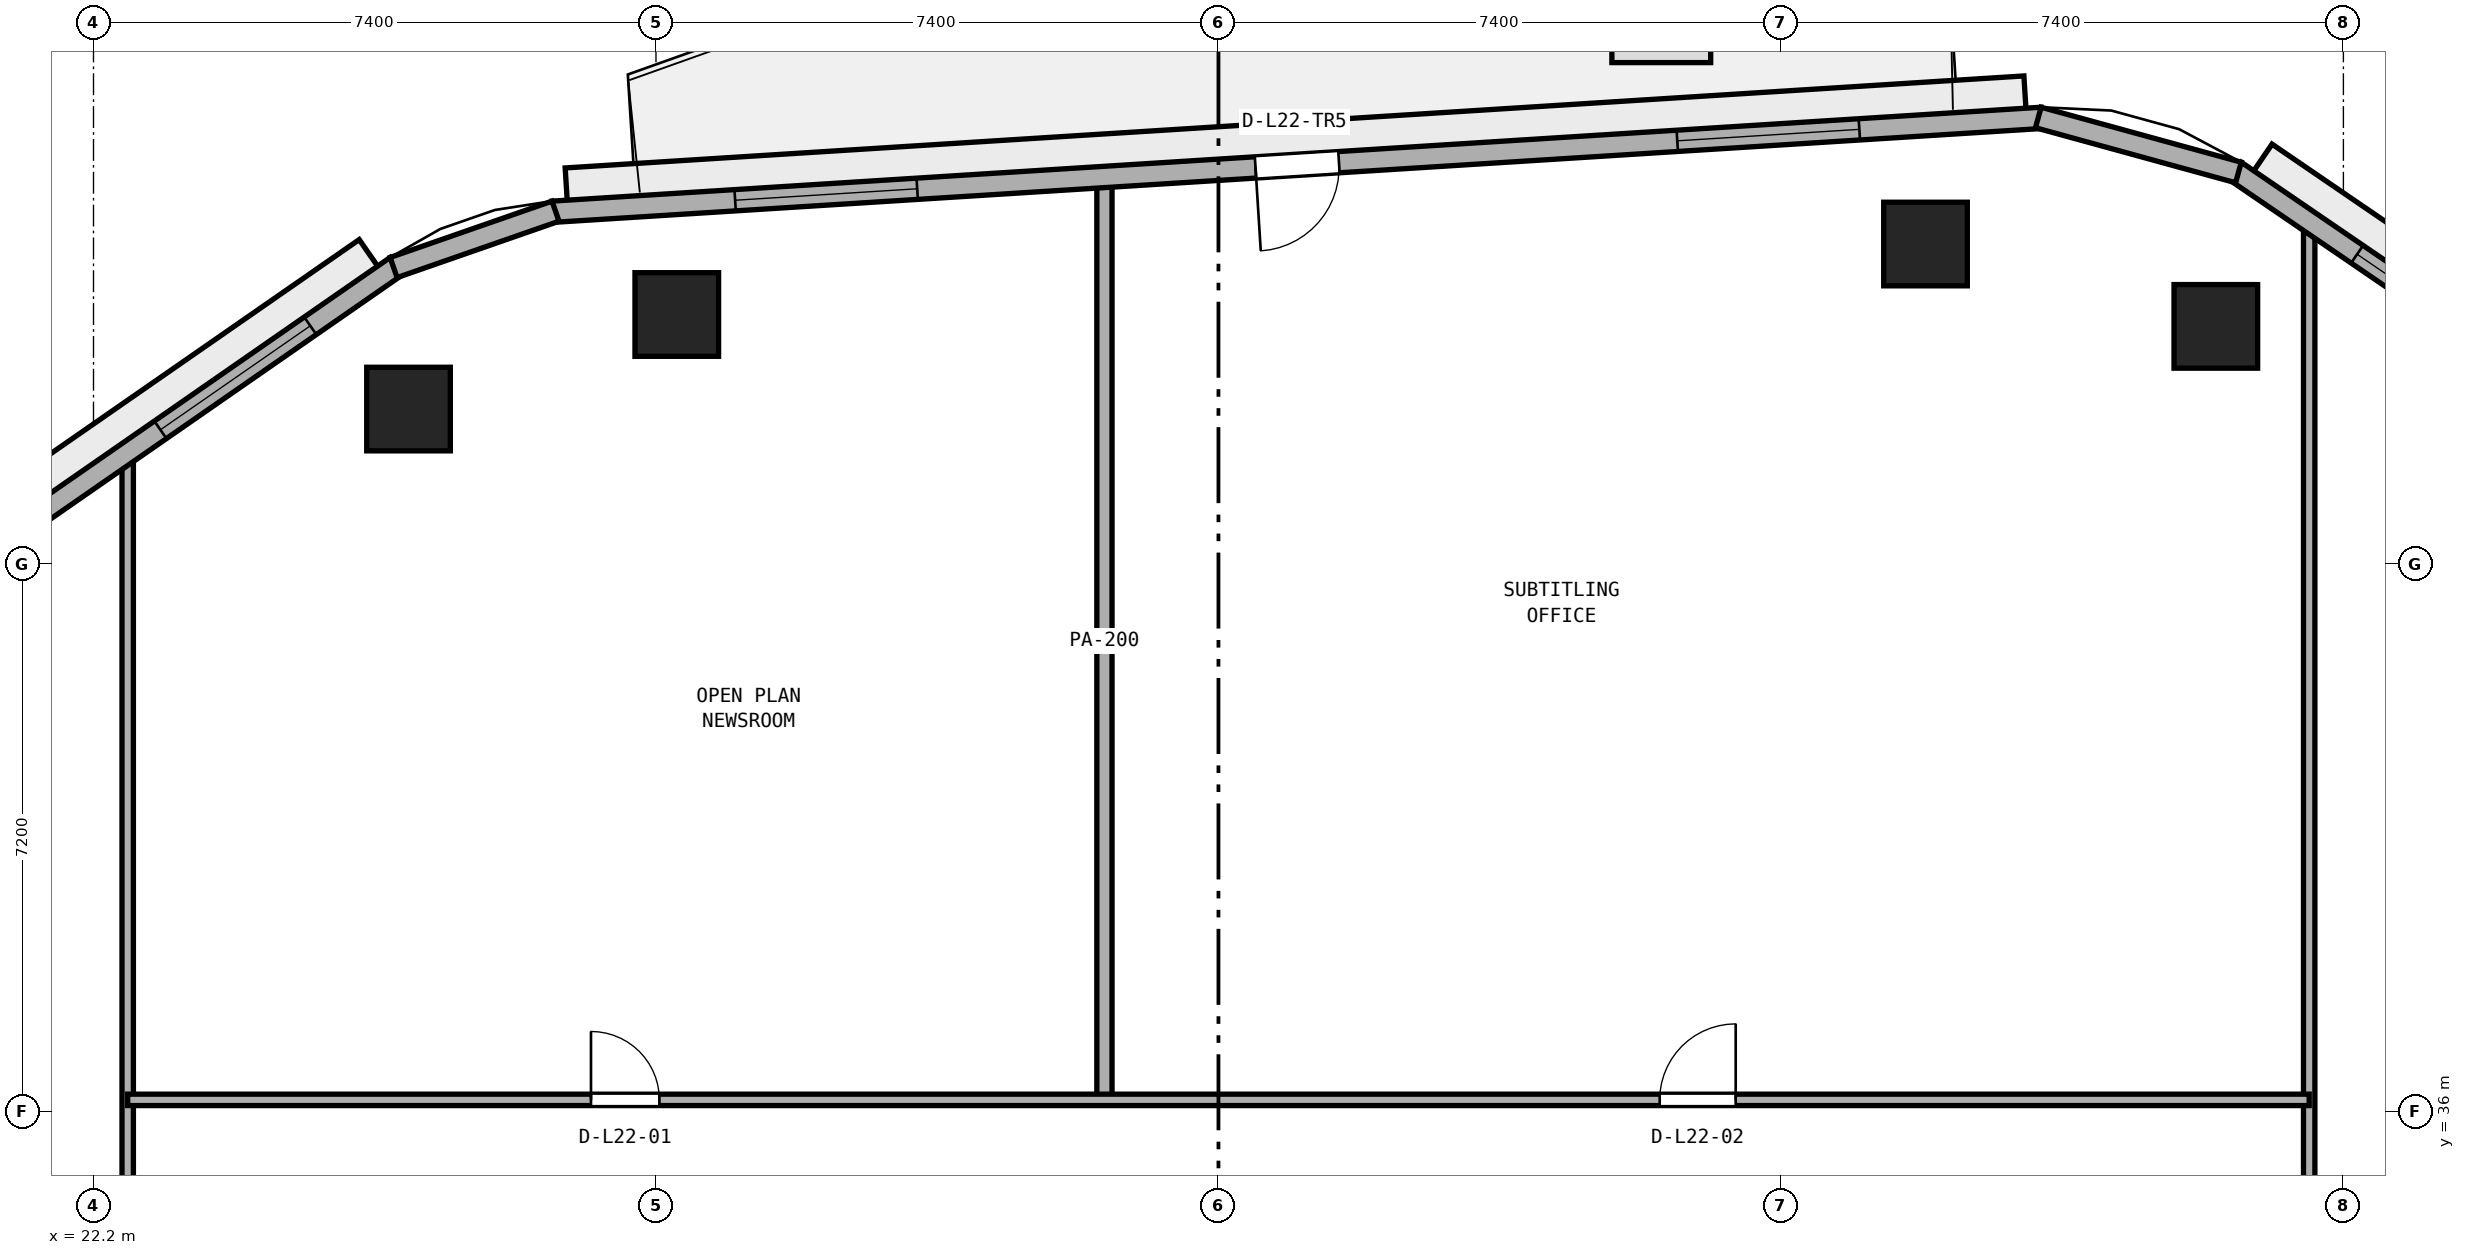
"""IFC4 building model, lengths in metres.
Left out: names, types, materials, properties, quantities, classifications, styles, units other than length and angle.
Written with IfcOpenShell. Run it as: python <this file> out.ifc"""

import sys

from ifc_helpers import new_model, si_unit, direction, frame, frame_2d, origin, origin_2d, place, context, subcontext, project, spatial, rectangle, extrude, element, fill, save


model = new_model("IFC4")
c1 = context("Model", 3, precision=1e-05, world=origin(), true_north=direction((0.0, 1.0)))
c2 = subcontext(c1, "Body", "Model", "MODEL_VIEW")
j1 = project(units=[si_unit("LENGTHUNIT", "METRE"), si_unit("PLANEANGLEUNIT", "RADIAN")], contexts=[c1])
p1 = place(None, origin())
s1 = spatial("IfcSite", under=j1, at=p1, CompositionType="ELEMENT")
p2 = place(p1, origin())
s2 = spatial("IfcBuilding", under=s1, at=p2, CompositionType="ELEMENT")
p3 = place(p2, frame((0.0, 0.0, 89.6)))
s3 = spatial("IfcBuildingStorey", under=s2, at=p3, CompositionType="ELEMENT", Elevation=89.6)
for number, where, z_axis, x_axis in (
    (1, (50.122, 46.326, 0.0), (0.0, 0.0, 1.0), (1.0, 0.0, 0.0)),
    (2, (46.302, 47.409, 0.0), (0.0, 0.0, 1.0), (1.0, 0.0, 0.0)),
    (3, (29.874, 46.482, 0.0), (0.0, 0.0, 1.0), (1.0, 0.0, 0.0)),
    (4, (26.344, 45.238, 0.0), (0.0, 0.0, 1.0), (1.0, 0.0, 0.0)),
):
    element("IfcColumn", number, at=place(p3, frame(where, z_axis=z_axis, x_axis=x_axis)), inside=s3, PredefinedType="COLUMN", context=c2, shape_type="SweptSolid", body=[
        extrude(rectangle(XDim=1.1, YDim=1.1, at=origin_2d()), origin(), (0.0, 0.0, 1.0), 3.8),
    ])
p4 = place(p3, frame((51.35, 2.843, 0.0), z_axis=(0.0, 0.0, 1.0), x_axis=(0.0, 1.0, 0.0)))
e5 = element("IfcWall", 5, at=p4, inside=s3, PredefinedType="PARTITIONING", context=c2, shape_type="SweptSolid", body=[
    extrude(rectangle(XDim=44.892, YDim=0.15, at=frame_2d((22.446, 0.0))), origin(), (0.0, 0.0, 1.0), 3.525),
])
p5 = place(p4, frame((21.907, 0.0, 0.0)))
e6 = element("IfcOpeningElement", 6, at=p5, cuts=e5, PredefinedType="OPENING", context=c2, shape_type="SweptSolid", body=[
    extrude(rectangle(XDim=0.9, YDim=2.1, at=frame_2d((0.45, 1.05))), frame((0.0, 0.085, 0.0), z_axis=(0.0, -1.0, 0.0), x_axis=(1.0, 0.0, 0.0)), (0.0, 0.0, 1.0), 0.17),
])
p6 = place(p3, frame((35.5, 36.15, 0.0), z_axis=(0.0, 0.0, 1.0), x_axis=(0.0, 1.0, 0.0)))
e7 = element("IfcWall", 7, at=p6, inside=s3, PredefinedType="PARTITIONING", context=c2, shape_type="SweptSolid", body=[
    extrude(rectangle(XDim=12.077, YDim=0.2, at=frame_2d((6.039, 0.0))), origin(), (0.0, 0.0, 1.0), 3.525),
])
p7 = place(p3, frame((22.65, 5.476, 0.0), z_axis=(0.0, 0.0, 1.0), x_axis=(0.0, 1.0, 0.0)))
e8 = element("IfcWall", 8, at=p7, inside=s3, PredefinedType="PARTITIONING", context=c2, shape_type="SweptSolid", body=[
    extrude(rectangle(XDim=39.221, YDim=0.15, at=frame_2d((19.61, 0.0))), origin(), (0.0, 0.0, 1.0), 3.525),
])
p8 = place(p7, frame((11.199, 0.0, 0.0)))
e9 = element("IfcOpeningElement", 9, at=p8, cuts=e8, PredefinedType="OPENING", context=c2, shape_type="SweptSolid", body=[
    extrude(rectangle(XDim=0.9, YDim=2.1, at=frame_2d((0.45, 1.05))), frame((0.0, 0.085, 0.0), z_axis=(0.0, -1.0, 0.0), x_axis=(1.0, 0.0, 0.0)), (0.0, 0.0, 1.0), 0.17),
])
p9 = place(p7, frame((17.824, 0.0, 0.0)))
e10 = element("IfcOpeningElement", 10, at=p9, cuts=e8, PredefinedType="OPENING", context=c2, shape_type="SweptSolid", body=[
    extrude(rectangle(XDim=0.9, YDim=2.1, at=frame_2d((0.45, 1.05))), frame((0.0, 0.085, 0.0), z_axis=(0.0, -1.0, 0.0), x_axis=(1.0, 0.0, 0.0)), (0.0, 0.0, 1.0), 0.17),
])
p10 = place(p7, frame((25.899, 0.0, 0.0)))
e11 = element("IfcOpeningElement", 11, at=p10, cuts=e8, PredefinedType="OPENING", context=c2, shape_type="SweptSolid", body=[
    extrude(rectangle(XDim=0.9, YDim=2.1, at=frame_2d((0.45, 1.05))), frame((0.0, 0.085, 0.0), z_axis=(0.0, -1.0, 0.0), x_axis=(1.0, 0.0, 0.0)), (0.0, 0.0, 1.0), 0.17),
])
p11 = place(p3, frame((22.65, 36.15, 0.0), z_axis=(0.0, 0.0, 1.0), x_axis=(1.0, 0.0, 0.0)))
e12 = element("IfcWall", 12, at=p11, inside=s3, PredefinedType="PARTITIONING", context=c2, shape_type="SweptSolid", body=[
    extrude(rectangle(XDim=28.7, YDim=0.15, at=frame_2d((14.35, 0.0))), origin(), (0.0, 0.0, 1.0), 3.525),
])
p12 = place(p11, frame((6.095, 0.0, 0.0)))
e13 = element("IfcOpeningElement", 13, at=p12, cuts=e12, PredefinedType="OPENING", context=c2, shape_type="SweptSolid", body=[
    extrude(rectangle(XDim=0.9, YDim=2.1, at=frame_2d((0.45, 1.05))), frame((0.0, 0.085, 0.0), z_axis=(0.0, -1.0, 0.0), x_axis=(1.0, 0.0, 0.0)), (0.0, 0.0, 1.0), 0.17),
])
p13 = place(p11, frame((20.155, 0.0, 0.0)))
e14 = element("IfcOpeningElement", 14, at=p13, cuts=e12, PredefinedType="OPENING", context=c2, shape_type="SweptSolid", body=[
    extrude(rectangle(XDim=1.0, YDim=2.12, at=frame_2d((0.5, 1.06))), frame((0.0, 0.085, 0.0), z_axis=(0.0, -1.0, 0.0), x_axis=(1.0, 0.0, 0.0)), (0.0, 0.0, 1.0), 0.17),
])
p14 = place(p3, frame((64.29, 38.867, 0.0), z_axis=(0.0, 0.0, 1.0), x_axis=(-0.825755550159, 0.564028165416, 0.0)))
e15 = element("IfcWall", 15, at=p14, inside=s3, PredefinedType="STANDARD", context=c2, shape_type="SweptSolid", body=[
    extrude(rectangle(XDim=16.848, YDim=0.28, at=frame_2d((8.424, 0.0))), origin(), (0.0, 0.0, 1.0), 3.525),
])
p15 = place(p14, frame((1.941, 0.0, 0.9)))
e16 = element("IfcOpeningElement", 16, at=p15, cuts=e15, PredefinedType="OPENING", context=c2, shape_type="SweptSolid", body=[
    extrude(rectangle(XDim=2.4, YDim=1.75, at=frame_2d((1.2, 0.875))), frame((0.0, 0.15, 0.0), z_axis=(0.0, -1.0, 0.0), x_axis=(1.0, 0.0, 0.0)), (0.0, 0.0, 1.0), 0.3),
])
p16 = place(p14, frame((7.224, 0.0, 0.9)))
e17 = element("IfcOpeningElement", 17, at=p16, cuts=e15, PredefinedType="OPENING", context=c2, shape_type="SweptSolid", body=[
    extrude(rectangle(XDim=2.4, YDim=1.75, at=frame_2d((1.2, 0.875))), frame((0.0, 0.15, 0.0), z_axis=(0.0, -1.0, 0.0), x_axis=(1.0, 0.0, 0.0)), (0.0, 0.0, 1.0), 0.3),
])
p17 = place(p14, frame((12.507, 0.0, 0.9)))
e18 = element("IfcOpeningElement", 18, at=p17, cuts=e15, PredefinedType="OPENING", context=c2, shape_type="SweptSolid", body=[
    extrude(rectangle(XDim=2.4, YDim=1.75, at=frame_2d((1.2, 0.875))), frame((0.0, 0.15, 0.0), z_axis=(0.0, -1.0, 0.0), x_axis=(1.0, 0.0, 0.0)), (0.0, 0.0, 1.0), 0.3),
])
p18 = place(p3, frame((47.832, 49.069, 0.0), z_axis=(0.0, 0.0, 1.0), x_axis=(-0.998017725054, -0.062933460723, 0.0)))
e19 = element("IfcWall", 19, at=p18, inside=s3, PredefinedType="STANDARD", context=c2, shape_type="SweptSolid", body=[
    extrude(rectangle(XDim=19.629, YDim=0.28, at=frame_2d((9.815, 0.0))), origin(), (0.0, 0.0, 1.0), 3.525),
])
p19 = place(p18, frame((9.265, 0.0, 0.0)))
e20 = element("IfcOpeningElement", 20, at=p19, cuts=e19, PredefinedType="OPENING", context=c2, shape_type="SweptSolid", body=[
    extrude(rectangle(XDim=1.1, YDim=2.2, at=frame_2d((0.55, 1.1))), frame((0.0, 0.15, 0.0), z_axis=(0.0, -1.0, 0.0), x_axis=(1.0, 0.0, 0.0)), (0.0, 0.0, 1.0), 0.3),
])
p20 = place(p18, frame((2.405, 0.0, 0.9)))
e21 = element("IfcOpeningElement", 21, at=p20, cuts=e19, PredefinedType="OPENING", context=c2, shape_type="SweptSolid", body=[
    extrude(rectangle(XDim=2.4, YDim=1.75, at=frame_2d((1.2, 0.875))), frame((0.0, 0.15, 0.0), z_axis=(0.0, -1.0, 0.0), x_axis=(1.0, 0.0, 0.0)), (0.0, 0.0, 1.0), 0.3),
])
p21 = place(p18, frame((14.825, 0.0, 0.9)))
e22 = element("IfcOpeningElement", 22, at=p21, cuts=e19, PredefinedType="OPENING", context=c2, shape_type="SweptSolid", body=[
    extrude(rectangle(XDim=2.4, YDim=1.75, at=frame_2d((1.2, 0.875))), frame((0.0, 0.15, 0.0), z_axis=(0.0, -1.0, 0.0), x_axis=(1.0, 0.0, 0.0)), (0.0, 0.0, 1.0), 0.3),
])
p22 = place(p3, frame((26.182, 47.118, 0.0), z_axis=(0.0, 0.0, 1.0), x_axis=(-0.821547956627, -0.570139417127, 0.0)))
e23 = element("IfcWall", 23, at=p22, inside=s3, PredefinedType="STANDARD", context=c2, shape_type="SweptSolid", body=[
    extrude(rectangle(XDim=18.132, YDim=0.28, at=frame_2d((9.066, 0.0))), origin(), (0.0, 0.0, 1.0), 3.525),
])
p23 = place(p22, frame((1.375, 0.0, 0.9)))
e24 = element("IfcOpeningElement", 24, at=p23, cuts=e23, PredefinedType="OPENING", context=c2, shape_type="SweptSolid", body=[
    extrude(rectangle(XDim=2.4, YDim=1.75, at=frame_2d((1.2, 0.875))), frame((0.0, 0.15, 0.0), z_axis=(0.0, -1.0, 0.0), x_axis=(1.0, 0.0, 0.0)), (0.0, 0.0, 1.0), 0.3),
])
p24 = place(p22, frame((7.866, 0.0, 0.9)))
e25 = element("IfcOpeningElement", 25, at=p24, cuts=e23, PredefinedType="OPENING", context=c2, shape_type="SweptSolid", body=[
    extrude(rectangle(XDim=2.4, YDim=1.75, at=frame_2d((1.2, 0.875))), frame((0.0, 0.15, 0.0), z_axis=(0.0, -1.0, 0.0), x_axis=(1.0, 0.0, 0.0)), (0.0, 0.0, 1.0), 0.3),
])
p25 = place(p22, frame((13.577, 0.0, 0.9)))
e26 = element("IfcOpeningElement", 26, at=p25, cuts=e23, PredefinedType="OPENING", context=c2, shape_type="SweptSolid", body=[
    extrude(rectangle(XDim=2.4, YDim=1.75, at=frame_2d((1.2, 0.875))), frame((0.0, 0.15, 0.0), z_axis=(0.0, -1.0, 0.0), x_axis=(1.0, 0.0, 0.0)), (0.0, 0.0, 1.0), 0.3),
])
p26 = place(p3, frame((50.419, 48.351, 0.0), z_axis=(0.0, 0.0, 1.0), x_axis=(-0.964254516967, 0.264977784933, 0.0)))
e27 = element("IfcWall", 27, at=p26, inside=s3, PredefinedType="STANDARD", context=c2, shape_type="SweptSolid", body=[
    extrude(rectangle(XDim=2.731, YDim=0.28, at=frame_2d((1.365, 0.0))), origin(), (0.0, 0.0, 1.0), 3.525),
])
p27 = place(p3, frame((28.278, 47.842, 0.0), z_axis=(0.0, 0.0, 1.0), x_axis=(-0.9444559001, -0.328638179106, 0.0)))
e28 = element("IfcWall", 28, at=p27, inside=s3, PredefinedType="STANDARD", context=c2, shape_type="SweptSolid", body=[
    extrude(rectangle(XDim=2.255, YDim=0.28, at=frame_2d((1.128, 0.0))), origin(), (0.0, 0.0, 1.0), 3.525),
])
p28 = place(p12, origin())
e29 = element("IfcDoor", 29, at=p28, inside=s3, OperationType="SINGLE_SWING_LEFT", PredefinedType="DOOR", context=c2, shape_type="SweptSolid", body=[
    extrude(rectangle(XDim=0.9, YDim=2.1, at=frame_2d((0.45, 1.05))), frame((0.0, 0.025, 0.0), z_axis=(0.0, -1.0, 0.0), x_axis=(1.0, 0.0, 0.0)), (0.0, 0.0, 1.0), 0.05),
])
fill(e13, e29)
p29 = place(p13, origin())
e30 = element("IfcDoor", 30, at=p29, inside=s3, OperationType="SINGLE_SWING_RIGHT", PredefinedType="DOOR", context=c2, shape_type="SweptSolid", body=[
    extrude(rectangle(XDim=1.0, YDim=2.12, at=frame_2d((0.5, 1.06))), frame((0.0, 0.025, 0.0), z_axis=(0.0, -1.0, 0.0), x_axis=(1.0, 0.0, 0.0)), (0.0, 0.0, 1.0), 0.05),
])
fill(e14, e30)
p30 = place(p17, origin())
e31 = element("IfcWindow", 31, at=p30, inside=s3, PartitioningType="SINGLE_PANEL", PredefinedType="WINDOW", context=c2, shape_type="SweptSolid", body=[
    extrude(rectangle(XDim=2.4, YDim=1.75, at=frame_2d((1.2, 0.875))), frame((0.0, 0.03, 0.0), z_axis=(0.0, -1.0, 0.0), x_axis=(1.0, 0.0, 0.0)), (0.0, 0.0, 1.0), 0.06),
])
fill(e18, e31)
p31 = place(p19, origin())
e32 = element("IfcDoor", 32, at=p31, inside=s3, OperationType="SINGLE_SWING_RIGHT", PredefinedType="DOOR", context=c2, shape_type="SweptSolid", body=[
    extrude(rectangle(XDim=1.1, YDim=2.2, at=frame_2d((0.55, 1.1))), frame((0.0, 0.025, 0.0), z_axis=(0.0, -1.0, 0.0), x_axis=(1.0, 0.0, 0.0)), (0.0, 0.0, 1.0), 0.05),
])
fill(e20, e32)
p32 = place(p20, origin())
e33 = element("IfcWindow", 33, at=p32, inside=s3, PartitioningType="SINGLE_PANEL", PredefinedType="WINDOW", context=c2, shape_type="SweptSolid", body=[
    extrude(rectangle(XDim=2.4, YDim=1.75, at=frame_2d((1.2, 0.875))), frame((0.0, 0.03, 0.0), z_axis=(0.0, -1.0, 0.0), x_axis=(1.0, 0.0, 0.0)), (0.0, 0.0, 1.0), 0.06),
])
fill(e21, e33)
p33 = place(p21, origin())
e34 = element("IfcWindow", 34, at=p33, inside=s3, PartitioningType="SINGLE_PANEL", PredefinedType="WINDOW", context=c2, shape_type="SweptSolid", body=[
    extrude(rectangle(XDim=2.4, YDim=1.75, at=frame_2d((1.2, 0.875))), frame((0.0, 0.03, 0.0), z_axis=(0.0, -1.0, 0.0), x_axis=(1.0, 0.0, 0.0)), (0.0, 0.0, 1.0), 0.06),
])
fill(e22, e34)
p34 = place(p23, origin())
e35 = element("IfcWindow", 35, at=p34, inside=s3, PartitioningType="SINGLE_PANEL", PredefinedType="WINDOW", context=c2, shape_type="SweptSolid", body=[
    extrude(rectangle(XDim=2.4, YDim=1.75, at=frame_2d((1.2, 0.875))), frame((0.0, 0.03, 0.0), z_axis=(0.0, -1.0, 0.0), x_axis=(1.0, 0.0, 0.0)), (0.0, 0.0, 1.0), 0.06),
])
fill(e24, e35)
save(model, sys.argv[1])
